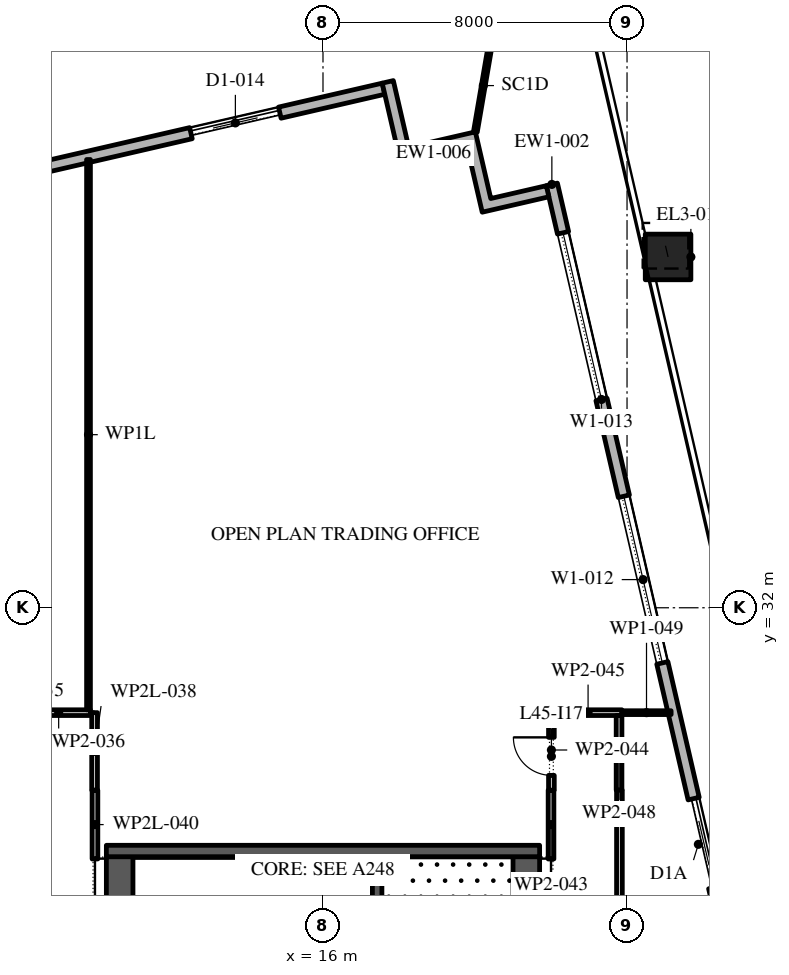
"""IFC4 building model, lengths in metres.
Left out: names, types, materials, properties, quantities, classifications, styles, units other than length and angle.
Written with IfcOpenShell. Run it as: python <this file> out.ifc"""

import sys

from ifc_helpers import new_model, si_unit, direction, frame, frame_2d, origin, origin_2d, place, context, subcontext, project, spatial, polyline, rectangle, outline, extrude, element, fill, save


model = new_model("IFC4")
c1 = context("Model", 3, precision=1e-05, world=origin(), true_north=direction((0.0, 1.0)))
c2 = subcontext(c1, "Body", "Model", "MODEL_VIEW")
j1 = project(units=[si_unit("LENGTHUNIT", "METRE"), si_unit("PLANEANGLEUNIT", "RADIAN")], contexts=[c1])
p1 = place(None, origin())
s1 = spatial("IfcSite", under=j1, at=p1, CompositionType="ELEMENT")
p2 = place(p1, origin())
s2 = spatial("IfcBuilding", under=s1, at=p2, CompositionType="ELEMENT")
p3 = place(p2, frame((0.0, 0.0, 205.2)))
s3 = spatial("IfcBuildingStorey", under=s2, at=p3, CompositionType="ELEMENT", Elevation=205.2)
p4 = place(p3, frame((26.941, 33.167, 0.0), z_axis=(-0.013461754246, 0.058430976405, 0.998200682312), x_axis=(-0.974472679268, -0.224506118759, 0.0)))
e1 = element("IfcColumn", 1, at=p4, inside=s3, PredefinedType="COLUMN", context=c2, shape_type="SweptSolid", body=[
    extrude(rectangle(XDim=1.2, YDim=1.2, at=origin_2d()), origin(), (0.0, 0.0, 1.0), 4.208),
])
p5 = place(p3, frame((25.08, 41.23, 0.0), z_axis=(-0.016176212764, 0.069980963462, 0.99741716192), x_axis=(-0.974309502923, -0.225213215672, 0.0)))
e2 = element("IfcColumn", 2, at=p5, inside=s3, PredefinedType="COLUMN", context=c2, shape_type="SweptSolid", body=[
    extrude(rectangle(XDim=1.2, YDim=1.2, at=origin_2d()), origin(), (0.0, 0.0, 1.0), 4.211),
])
p6 = place(p3, frame((33.157, -5.092, 0.0), z_axis=(0.0, 0.0, 1.0), x_axis=(-0.224950279389, 0.974370243697, 0.0)))
e3 = element("IfcWall", 3, at=p6, inside=s3, PredefinedType="STANDARD", context=c2, shape_type="SweptSolid", body=[
    extrude(rectangle(XDim=49.5, YDim=0.3, at=frame_2d((24.75, 0.0))), origin(), (0.0, 0.0, 1.0), 4.0),
])
p7 = place(p6, frame((2.207, 0.0, 0.0)))
e4 = element("IfcOpeningElement", 4, at=p7, cuts=e3, PredefinedType="OPENING", context=c2, shape_type="SweptSolid", body=[
    extrude(rectangle(XDim=2.4, YDim=3.125, at=frame_2d((1.2, 1.562))), frame((0.0, 0.16, 0.0), z_axis=(0.0, -1.0, 0.0), x_axis=(1.0, 0.0, 0.0)), (0.0, 0.0, 1.0), 0.32),
])
p8 = place(p6, frame((8.121, 0.0, 0.45)))
e5 = element("IfcOpeningElement", 5, at=p8, cuts=e3, PredefinedType="OPENING", context=c2, shape_type="SweptSolid", body=[
    extrude(rectangle(XDim=4.5, YDim=2.875, at=frame_2d((2.25, 1.438))), frame((0.0, 0.16, 0.0), z_axis=(0.0, -1.0, 0.0), x_axis=(1.0, 0.0, 0.0)), (0.0, 0.0, 1.0), 0.32),
])
p9 = place(p6, frame((15.236, 0.0, 0.45)))
e6 = element("IfcOpeningElement", 6, at=p9, cuts=e3, PredefinedType="OPENING", context=c2, shape_type="SweptSolid", body=[
    extrude(rectangle(XDim=4.5, YDim=2.875, at=frame_2d((2.25, 1.438))), frame((0.0, 0.16, 0.0), z_axis=(0.0, -1.0, 0.0), x_axis=(1.0, 0.0, 0.0)), (0.0, 0.0, 1.0), 0.32),
])
p10 = place(p6, frame((22.35, 0.0, 0.45)))
e7 = element("IfcOpeningElement", 7, at=p10, cuts=e3, PredefinedType="OPENING", context=c2, shape_type="SweptSolid", body=[
    extrude(rectangle(XDim=4.5, YDim=3.0, at=frame_2d((2.25, 1.5))), frame((0.0, 0.16, 0.0), z_axis=(0.0, -1.0, 0.0), x_axis=(1.0, 0.0, 0.0)), (0.0, 0.0, 1.0), 0.32),
])
p11 = place(p6, frame((30.514, 0.0, 0.0)))
e8 = element("IfcOpeningElement", 8, at=p11, cuts=e3, PredefinedType="OPENING", context=c2, shape_type="SweptSolid", body=[
    extrude(rectangle(XDim=2.4, YDim=3.45, at=frame_2d((1.2, 1.725))), frame((0.0, 0.16, 0.0), z_axis=(0.0, -1.0, 0.0), x_axis=(1.0, 0.0, 0.0)), (0.0, 0.0, 1.0), 0.32),
])
p12 = place(p6, frame((36.579, 0.0, 0.45)))
e9 = element("IfcOpeningElement", 9, at=p12, cuts=e3, PredefinedType="OPENING", context=c2, shape_type="SweptSolid", body=[
    extrude(rectangle(XDim=4.5, YDim=3.05, at=frame_2d((2.25, 1.525))), frame((0.0, 0.16, 0.0), z_axis=(0.0, -1.0, 0.0), x_axis=(1.0, 0.0, 0.0)), (0.0, 0.0, 1.0), 0.32),
])
p13 = place(p6, frame((43.693, 0.0, 0.45)))
e10 = element("IfcOpeningElement", 10, at=p13, cuts=e3, PredefinedType="OPENING", context=c2, shape_type="SweptSolid", body=[
    extrude(rectangle(XDim=4.5, YDim=3.05, at=frame_2d((2.25, 1.525))), frame((0.0, 0.16, 0.0), z_axis=(0.0, -1.0, 0.0), x_axis=(1.0, 0.0, 0.0)), (0.0, 0.0, 1.0), 0.32),
])
p14 = place(p3, frame((17.592, 45.657, 0.0), z_axis=(0.0, 0.0, 1.0), x_axis=(-0.974370243697, -0.224950279389, 0.0)))
e11 = element("IfcWall", 11, at=p14, inside=s3, PredefinedType="STANDARD", context=c2, shape_type="SweptSolid", body=[
    extrude(rectangle(XDim=49.5, YDim=0.3, at=frame_2d((24.75, 0.0))), origin(), (0.0, 0.0, 1.0), 4.0),
])
p15 = place(p14, frame((2.8, 0.0, 0.0)))
e12 = element("IfcOpeningElement", 12, at=p15, cuts=e11, PredefinedType="OPENING", context=c2, shape_type="SweptSolid", body=[
    extrude(rectangle(XDim=2.4, YDim=3.5, at=frame_2d((1.2, 1.75))), frame((0.0, 0.16, 0.0), z_axis=(0.0, -1.0, 0.0), x_axis=(1.0, 0.0, 0.0)), (0.0, 0.0, 1.0), 0.32),
])
p16 = place(p14, frame((9.9, 0.0, 0.45)))
e13 = element("IfcOpeningElement", 13, at=p16, cuts=e11, PredefinedType="OPENING", context=c2, shape_type="SweptSolid", body=[
    extrude(rectangle(XDim=4.5, YDim=2.45, at=frame_2d((2.25, 1.225))), frame((0.0, 0.16, 0.0), z_axis=(0.0, -1.0, 0.0), x_axis=(1.0, 0.0, 0.0)), (0.0, 0.0, 1.0), 0.32),
])
p17 = place(p14, frame((18.2, 0.0, 0.45)))
e14 = element("IfcOpeningElement", 14, at=p17, cuts=e11, PredefinedType="OPENING", context=c2, shape_type="SweptSolid", body=[
    extrude(rectangle(XDim=4.5, YDim=2.45, at=frame_2d((2.25, 1.225))), frame((0.0, 0.16, 0.0), z_axis=(0.0, -1.0, 0.0), x_axis=(1.0, 0.0, 0.0)), (0.0, 0.0, 1.0), 0.32),
])
p18 = place(p14, frame((26.5, 0.0, 0.45)))
e15 = element("IfcOpeningElement", 15, at=p18, cuts=e11, PredefinedType="OPENING", context=c2, shape_type="SweptSolid", body=[
    extrude(rectangle(XDim=4.5, YDim=2.45, at=frame_2d((2.25, 1.225))), frame((0.0, 0.16, 0.0), z_axis=(0.0, -1.0, 0.0), x_axis=(1.0, 0.0, 0.0)), (0.0, 0.0, 1.0), 0.32),
])
p19 = place(p14, frame((35.85, 0.0, 0.0)))
e16 = element("IfcOpeningElement", 16, at=p19, cuts=e11, PredefinedType="OPENING", context=c2, shape_type="SweptSolid", body=[
    extrude(rectangle(XDim=2.4, YDim=3.5, at=frame_2d((1.2, 1.75))), frame((0.0, 0.16, 0.0), z_axis=(0.0, -1.0, 0.0), x_axis=(1.0, 0.0, 0.0)), (0.0, 0.0, 1.0), 0.32),
])
p20 = place(p14, frame((43.1, 0.0, 0.45)))
e17 = element("IfcOpeningElement", 17, at=p20, cuts=e11, PredefinedType="OPENING", context=c2, shape_type="SweptSolid", body=[
    extrude(rectangle(XDim=4.5, YDim=2.575, at=frame_2d((2.25, 1.288))), frame((0.0, 0.16, 0.0), z_axis=(0.0, -1.0, 0.0), x_axis=(1.0, 0.0, 0.0)), (0.0, 0.0, 1.0), 0.32),
])
p21 = place(p3, origin())
e18 = element("IfcWall", 18, at=p21, inside=s3, PredefinedType="STANDARD", context=c2, shape_type="SweptSolid", body=[
    extrude(outline(polyline([(19.785, 44.162), (18.031, 43.757), (17.558, 45.803), (17.851, 45.871), (18.256, 44.117), (20.01, 44.522), (20.414, 42.768), (21.876, 43.105), (21.943, 42.813), (20.19, 42.408), (19.785, 44.162)])), origin(), (0.0, 0.0, 1.0), 4.0),
])
p22 = place(p3, frame((20.01, 44.522, -0.05), z_axis=(0.0, 0.0, 1.0), x_axis=(0.169059801073, 0.985605795266, 0.0)))
e19 = element("IfcWall", 19, at=p22, inside=s3, PredefinedType="STANDARD", context=c2, shape_type="SweptSolid", body=[
    extrude(rectangle(XDim=2.471, YDim=0.1, at=frame_2d((1.235, 0.0))), origin(), (0.0, 0.0, 1.0), 3.07),
])
p23 = place(p3, frame((21.35, -2.45, 0.0), z_axis=(0.0, 0.0, 1.0), x_axis=(0.0, 1.0, 0.0)))
e20 = element("IfcWall", 20, at=p23, inside=s3, PredefinedType="SHEAR", context=c2, shape_type="SweptSolid", body=[
    extrude(rectangle(XDim=27.9, YDim=0.7, at=frame_2d((13.95, 0.0))), origin(), (0.0, 0.0, 1.0), 4.0),
])
p24 = place(p23, frame((5.05, 0.0, 0.0)))
e21 = element("IfcOpeningElement", 21, at=p24, cuts=e20, PredefinedType="OPENING", context=c2, shape_type="SweptSolid", body=[
    extrude(rectangle(XDim=1.2, YDim=2.1, at=frame_2d((0.6, 1.05))), frame((0.0, 0.36, 0.0), z_axis=(0.0, -1.0, 0.0), x_axis=(1.0, 0.0, 0.0)), (0.0, 0.0, 1.0), 0.72),
])
p25 = place(p23, frame((21.65, 0.0, 0.0)))
e22 = element("IfcOpeningElement", 22, at=p25, cuts=e20, PredefinedType="OPENING", context=c2, shape_type="SweptSolid", body=[
    extrude(rectangle(XDim=1.2, YDim=2.1, at=frame_2d((0.6, 1.05))), frame((0.0, 0.36, 0.0), z_axis=(0.0, -1.0, 0.0), x_axis=(1.0, 0.0, 0.0)), (0.0, 0.0, 1.0), 0.72),
])
p26 = place(p3, frame((10.65, -2.45, 0.0), z_axis=(0.0, 0.0, 1.0), x_axis=(0.0, 1.0, 0.0)))
e23 = element("IfcWall", 23, at=p26, inside=s3, PredefinedType="SHEAR", context=c2, shape_type="SweptSolid", body=[
    extrude(rectangle(XDim=27.9, YDim=0.7, at=frame_2d((13.95, 0.0))), origin(), (0.0, 0.0, 1.0), 4.0),
])
p27 = place(p26, frame((23.65, 0.0, 0.0)))
e24 = element("IfcOpeningElement", 24, at=p27, cuts=e23, PredefinedType="OPENING", context=c2, shape_type="SweptSolid", body=[
    extrude(rectangle(XDim=2.4, YDim=2.1, at=frame_2d((1.2, 1.05))), frame((0.0, 0.36, 0.0), z_axis=(0.0, -1.0, 0.0), x_axis=(1.0, 0.0, 0.0)), (0.0, 0.0, 1.0), 0.72),
])
p28 = place(p26, frame((1.087, 0.0, 0.0)))
e25 = element("IfcOpeningElement", 25, at=p28, cuts=e23, PredefinedType="OPENING", context=c2, shape_type="SweptSolid", body=[
    extrude(rectangle(XDim=0.9, YDim=2.1, at=frame_2d((0.45, 1.05))), frame((0.0, 0.36, 0.0), z_axis=(0.0, -1.0, 0.0), x_axis=(1.0, 0.0, 0.0)), (0.0, 0.0, 1.0), 0.72),
])
p29 = place(p26, frame((4.262, 0.0, 0.0)))
e26 = element("IfcOpeningElement", 26, at=p29, cuts=e23, PredefinedType="OPENING", context=c2, shape_type="SweptSolid", body=[
    extrude(rectangle(XDim=1.0, YDim=2.1, at=frame_2d((0.5, 1.05))), frame((0.0, 0.36, 0.0), z_axis=(0.0, -1.0, 0.0), x_axis=(1.0, 0.0, 0.0)), (0.0, 0.0, 1.0), 0.72),
])
p30 = place(p3, frame((10.3, 25.6, 0.0), z_axis=(0.0, 0.0, 1.0), x_axis=(1.0, 0.0, 0.0)))
e27 = element("IfcWall", 27, at=p30, inside=s3, PredefinedType="SHEAR", context=c2, shape_type="SweptSolid", body=[
    extrude(rectangle(XDim=11.4, YDim=0.3, at=frame_2d((5.7, 0.0))), origin(), (0.0, 0.0, 1.0), 4.0),
])
p31 = place(p3, frame((17.425, 19.15, 0.0), z_axis=(0.0, 0.0, 1.0), x_axis=(0.0, 1.0, 0.0)))
e28 = element("IfcWall", 28, at=p31, inside=s3, PredefinedType="SHEAR", context=c2, shape_type="SweptSolid", body=[
    extrude(rectangle(XDim=6.3, YDim=0.25, at=frame_2d((3.15, 0.0))), origin(), (0.0, 0.0, 1.0), 4.0),
])
p32 = place(p31, frame((0.05, 0.0, 0.0)))
e29 = element("IfcOpeningElement", 29, at=p32, cuts=e28, PredefinedType="OPENING", context=c2, shape_type="SweptSolid", body=[
    extrude(rectangle(XDim=1.2, YDim=2.1, at=frame_2d((0.6, 1.05))), frame((0.0, 0.135, 0.0), z_axis=(0.0, -1.0, 0.0), x_axis=(1.0, 0.0, 0.0)), (0.0, 0.0, 1.0), 0.27),
])
p33 = place(p3, frame((8.21, 29.24, 0.0), z_axis=(0.0, 0.0, 1.0), x_axis=(1.0, 0.0, 0.0)))
e30 = element("IfcWall", 30, at=p33, inside=s3, PredefinedType="PARTITIONING", context=c2, shape_type="SweptSolid", body=[
    extrude(rectangle(XDim=1.67, YDim=0.15, at=frame_2d((0.835, 0.0))), origin(), (0.0, 0.0, 1.0), 4.0),
])
p34 = place(p3, frame((9.83, 43.794, 0.0), z_axis=(0.0, 0.0, 1.0), x_axis=(0.0, -1.0, 0.0)))
e31 = element("IfcWall", 31, at=p34, inside=s3, PredefinedType="PARTITIONING", context=c2, shape_type="SweptSolid", body=[
    extrude(rectangle(XDim=14.479, YDim=0.1, at=frame_2d((7.24, 0.0))), origin(), (0.0, 0.0, 1.0), 3.02),
])
p35 = place(p3, frame((9.99, 29.24, 0.0), z_axis=(0.0, 0.0, 1.0), x_axis=(0.0, -1.0, 0.0)))
e32 = element("IfcWall", 32, at=p35, inside=s3, PredefinedType="PARTITIONING", context=c2, shape_type="SweptSolid", body=[
    extrude(rectangle(XDim=2.04, YDim=0.15, at=frame_2d((1.02, 0.0))), origin(), (0.0, 0.0, 1.0), 3.02),
])
p36 = place(p3, frame((10.0, 27.2, 0.0), z_axis=(0.0, 0.0, 1.0), x_axis=(0.0, -1.0, 0.0)))
e33 = element("IfcWall", 33, at=p36, inside=s3, PredefinedType="PARTITIONING", context=c2, shape_type="SweptSolid", body=[
    extrude(rectangle(XDim=1.81, YDim=0.15, at=frame_2d((0.905, 0.0))), origin(), (0.0, 0.0, 1.0), 3.02),
])
p37 = place(p3, frame((22.0, 25.39, 0.0), z_axis=(0.0, 0.0, 1.0), x_axis=(0.0, 1.0, 0.0)))
e34 = element("IfcWall", 34, at=p37, inside=s3, PredefinedType="PARTITIONING", context=c2, shape_type="SweptSolid", body=[
    extrude(rectangle(XDim=1.81, YDim=0.15, at=frame_2d((0.905, 0.0))), origin(), (0.0, 0.0, 1.0), 4.0),
])
p38 = place(p3, frame((22.01, 27.2, 0.0), z_axis=(0.0, 0.0, 1.0), x_axis=(0.0, 1.0, 0.0)))
e35 = element("IfcWall", 35, at=p38, inside=s3, PredefinedType="PARTITIONING", context=c2, shape_type="SweptSolid", body=[
    extrude(rectangle(XDim=2.115, YDim=0.15, at=frame_2d((1.058, 0.0))), origin(), (0.0, 0.0, 1.0), 4.0),
])
p39 = place(p38, frame((0.39, 0.0, 0.0)))
e36 = element("IfcOpeningElement", 36, at=p39, cuts=e35, PredefinedType="OPENING", context=c2, shape_type="SweptSolid", body=[
    extrude(rectangle(XDim=1.0, YDim=2.1, at=frame_2d((0.5, 1.05))), frame((0.0, 0.085, 0.0), z_axis=(0.0, -1.0, 0.0), x_axis=(1.0, 0.0, 0.0)), (0.0, 0.0, 1.0), 0.17),
])
p40 = place(p3, frame((22.085, 29.24, 0.0), z_axis=(0.0, 0.0, 1.0), x_axis=(1.0, 0.0, 0.0)))
e37 = element("IfcWall", 37, at=p40, inside=s3, PredefinedType="PARTITIONING", context=c2, shape_type="SweptSolid", body=[
    extrude(rectangle(XDim=1.78, YDim=0.15, at=frame_2d((0.89, 0.0))), origin(), (0.0, 0.0, 1.0), 4.0),
])
p41 = place(p3, frame((23.79, 29.165, 0.0), z_axis=(0.0, 0.0, 1.0), x_axis=(0.0, -1.0, 0.0)))
e38 = element("IfcWall", 38, at=p41, inside=s3, PredefinedType="PARTITIONING", context=c2, shape_type="SweptSolid", body=[
    extrude(rectangle(XDim=1.965, YDim=0.15, at=frame_2d((0.982, 0.0))), origin(), (0.0, 0.0, 1.0), 4.0),
])
p42 = place(p3, frame((23.865, 29.24, 0.0), z_axis=(0.0, 0.0, 1.0), x_axis=(1.0, 0.0, 0.0)))
e39 = element("IfcWall", 39, at=p42, inside=s3, PredefinedType="PARTITIONING", context=c2, shape_type="SweptSolid", body=[
    extrude(rectangle(XDim=1.295, YDim=0.1, at=frame_2d((0.647, 0.0))), origin(), (0.0, 0.0, 1.0), 4.0),
])
p43 = place(p3, frame((23.8, 27.2, 0.0), z_axis=(0.0, 0.0, 1.0), x_axis=(0.0, -1.0, 0.0)))
e40 = element("IfcWall", 40, at=p43, inside=s3, PredefinedType="PARTITIONING", context=c2, shape_type="SweptSolid", body=[
    extrude(rectangle(XDim=10.7, YDim=0.15, at=frame_2d((5.35, 0.0))), origin(), (0.0, 0.0, 1.0), 4.0),
])
p44 = place(p43, frame((6.0, 0.0, 0.0)))
e41 = element("IfcOpeningElement", 41, at=p44, cuts=e40, PredefinedType="OPENING", context=c2, shape_type="SweptSolid", body=[
    extrude(rectangle(XDim=1.0, YDim=2.1, at=frame_2d((0.5, 1.05))), frame((0.0, 0.085, 0.0), z_axis=(0.0, -1.0, 0.0), x_axis=(1.0, 0.0, 0.0)), (0.0, 0.0, 1.0), 0.17),
])
p45 = place(p11, origin())
e42 = element("IfcDoor", 42, at=p45, inside=s3, OperationType="DOUBLE_DOOR_SLIDING", PredefinedType="DOOR", context=c2, shape_type="SweptSolid", body=[
    extrude(rectangle(XDim=2.4, YDim=3.45, at=frame_2d((1.2, 1.725))), frame((0.0, 0.025, 0.0), z_axis=(0.0, -1.0, 0.0), x_axis=(1.0, 0.0, 0.0)), (0.0, 0.0, 1.0), 0.05),
])
fill(e8, e42)
p46 = place(p12, origin())
e43 = element("IfcWindow", 43, at=p46, inside=s3, PartitioningType="DOUBLE_PANEL_VERTICAL", PredefinedType="WINDOW", context=c2, shape_type="SweptSolid", body=[
    extrude(rectangle(XDim=4.5, YDim=3.05, at=frame_2d((2.25, 1.525))), frame((0.0, 0.03, 0.0), z_axis=(0.0, -1.0, 0.0), x_axis=(1.0, 0.0, 0.0)), (0.0, 0.0, 1.0), 0.06),
])
fill(e9, e43)
p47 = place(p13, origin())
e44 = element("IfcWindow", 44, at=p47, inside=s3, PartitioningType="DOUBLE_PANEL_VERTICAL", PredefinedType="WINDOW", context=c2, shape_type="SweptSolid", body=[
    extrude(rectangle(XDim=4.5, YDim=3.05, at=frame_2d((2.25, 1.525))), frame((0.0, 0.03, 0.0), z_axis=(0.0, -1.0, 0.0), x_axis=(1.0, 0.0, 0.0)), (0.0, 0.0, 1.0), 0.06),
])
fill(e10, e44)
p48 = place(p15, origin())
e45 = element("IfcDoor", 45, at=p48, inside=s3, OperationType="DOUBLE_DOOR_SLIDING", PredefinedType="DOOR", context=c2, shape_type="SweptSolid", body=[
    extrude(rectangle(XDim=2.4, YDim=3.5, at=frame_2d((1.2, 1.75))), frame((0.0, 0.025, 0.0), z_axis=(0.0, -1.0, 0.0), x_axis=(1.0, 0.0, 0.0)), (0.0, 0.0, 1.0), 0.05),
])
fill(e12, e45)
p49 = place(p39, origin())
e46 = element("IfcDoor", 46, at=p49, inside=s3, OperationType="SINGLE_SWING_LEFT", PredefinedType="DOOR", context=c2, shape_type="SweptSolid", body=[
    extrude(rectangle(XDim=1.0, YDim=2.1, at=frame_2d((0.5, 1.05))), frame((0.0, 0.025, 0.0), z_axis=(0.0, -1.0, 0.0), x_axis=(1.0, 0.0, 0.0)), (0.0, 0.0, 1.0), 0.05),
])
fill(e36, e46)
save(model, sys.argv[1])
